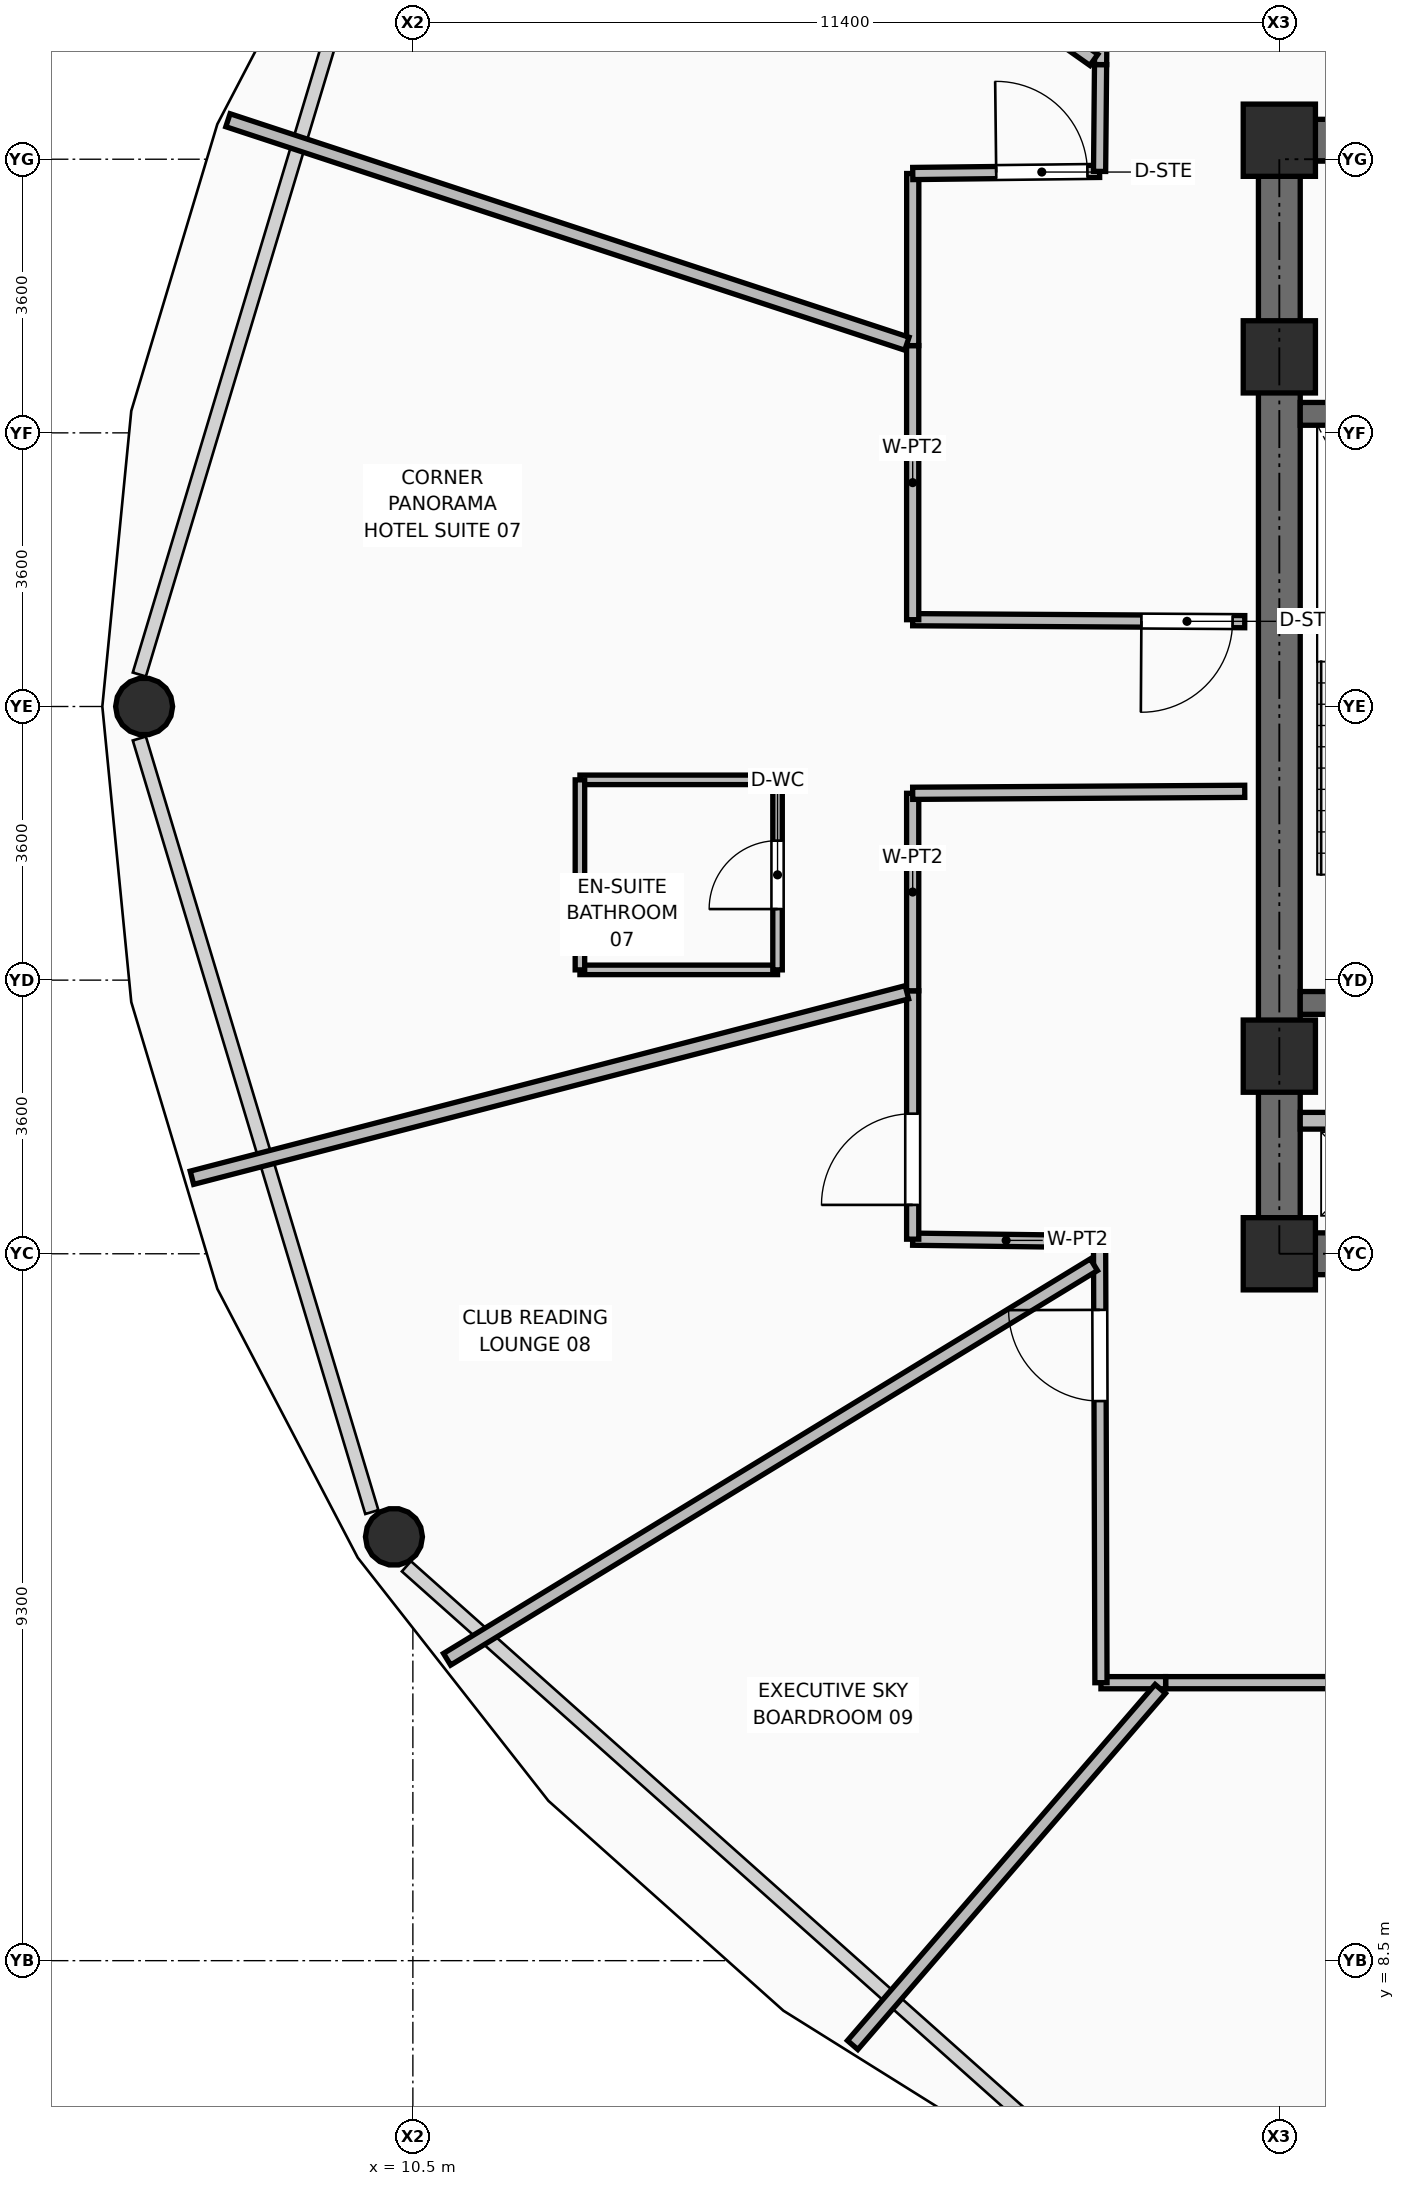
"""IFC4 building model, lengths in metres.
Left out: names, types, materials, properties, quantities, classifications, styles, units other than length and angle.
Written with IfcOpenShell. Run it as: python <this file> out.ifc"""

import sys

from ifc_helpers import new_model, si_unit, direction, frame, frame_2d, origin, origin_2d, place, context, subcontext, project, spatial, rectangle, hollow_circle, extrude, element, fill, save


model = new_model("IFC4")
c1 = context("Model", 3, precision=1e-05, world=origin(), true_north=direction((0.0, 1.0)))
c2 = subcontext(c1, "Body", "Model", "MODEL_VIEW")
j1 = project(units=[si_unit("LENGTHUNIT", "METRE"), si_unit("PLANEANGLEUNIT", "RADIAN")], contexts=[c1])
p1 = place(None, origin())
s1 = spatial("IfcSite", under=j1, at=p1, CompositionType="ELEMENT")
p2 = place(p1, origin())
s2 = spatial("IfcBuilding", under=s1, at=p2, CompositionType="ELEMENT")
p3 = place(p2, frame((0.0, 0.0, 164.7)))
s3 = spatial("IfcBuildingStorey", under=s2, at=p3, CompositionType="ELEMENT", Elevation=164.7)
for number, where, z_axis, x_axis in (
    (1, (21.9, 17.8, 0.0), (0.0, 0.0, 1.0), (1.0, 0.0, 0.0)),
    (2, (21.9, 20.4, 0.0), (0.0, 0.0, 1.0), (1.0, 0.0, 0.0)),
    (3, (21.9, 29.6, 0.0), (0.0, 0.0, 1.0), (1.0, 0.0, 0.0)),
    (4, (21.9, 32.45, 0.0), (0.0, 0.0, 1.0), (1.0, 0.0, 0.0)),
):
    element("IfcColumn", number, at=place(p3, frame(where, z_axis=z_axis, x_axis=x_axis)), inside=s3, PredefinedType="COLUMN", context=c2, shape_type="SweptSolid", body=[
        extrude(rectangle(XDim=0.95, YDim=0.95, at=origin_2d()), origin(), (0.0, 0.0, 1.0), 3.75),
    ])
for number, where, z_axis, x_axis in (
    (5, (6.964, 25.0, 0.0), (0.0, 0.0, 1.0), (1.0, 0.0, 0.0)),
    (6, (10.251, 14.076, 0.0), (0.0, 0.0, 1.0), (1.0, 0.0, 0.0)),
):
    element("IfcColumn", number, at=place(p3, frame(where, z_axis=z_axis, x_axis=x_axis)), inside=s3, PredefinedType="COLUMN", context=c2, shape_type="SweptSolid", body=[
        extrude(hollow_circle(Radius=0.375, WallThickness=0.035, at=origin_2d()), origin(), (0.0, 0.0, 1.0), 3.57),
    ])
p4 = place(p3, frame((21.625, 17.8, 0.0), z_axis=(0.0, 0.0, 1.0), x_axis=(1.0, 0.0, 0.0)))
e7 = element("IfcWall", 7, at=p4, inside=s3, PredefinedType="SHEAR", context=c2, shape_type="SweptSolid", body=[
    extrude(rectangle(XDim=2.125, YDim=0.55, at=frame_2d((1.062, 0.0))), origin(), (0.0, 0.0, 1.0), 3.57),
])
p5 = place(p3, frame((21.625, 32.45, 0.0), z_axis=(0.0, 0.0, 1.0), x_axis=(1.0, 0.0, 0.0)))
e8 = element("IfcWall", 8, at=p5, inside=s3, PredefinedType="SHEAR", context=c2, shape_type="SweptSolid", body=[
    extrude(rectangle(XDim=19.75, YDim=0.55, at=frame_2d((9.875, 0.0))), origin(), (0.0, 0.0, 1.0), 3.57),
])
p6 = place(p5, frame((2.125, 0.0, 0.0)))
e9 = element("IfcOpeningElement", 9, at=p6, cuts=e8, PredefinedType="OPENING", context=c2, shape_type="SweptSolid", body=[
    extrude(rectangle(XDim=1.1, YDim=2.1, at=frame_2d((0.55, 1.05))), frame((0.0, 0.285, 0.0), z_axis=(0.0, -1.0, 0.0), x_axis=(1.0, 0.0, 0.0)), (0.0, 0.0, 1.0), 0.57),
])
p7 = place(p5, frame((15.515, 0.0, 0.0)))
e10 = element("IfcOpeningElement", 10, at=p7, cuts=e8, PredefinedType="OPENING", context=c2, shape_type="SweptSolid", body=[
    extrude(rectangle(XDim=1.0, YDim=2.1, at=frame_2d((0.5, 1.05))), frame((0.0, 0.285, 0.0), z_axis=(0.0, -1.0, 0.0), x_axis=(1.0, 0.0, 0.0)), (0.0, 0.0, 1.0), 0.57),
])
p8 = place(p5, frame((17.525, 0.0, 0.0)))
e11 = element("IfcOpeningElement", 11, at=p8, cuts=e8, PredefinedType="OPENING", context=c2, shape_type="SweptSolid", body=[
    extrude(rectangle(XDim=0.9, YDim=2.1, at=frame_2d((0.45, 1.05))), frame((0.0, 0.285, 0.0), z_axis=(0.0, -1.0, 0.0), x_axis=(1.0, 0.0, 0.0)), (0.0, 0.0, 1.0), 0.57),
])
p9 = place(p3, frame((21.9, 18.075, 0.0), z_axis=(0.0, 0.0, 1.0), x_axis=(0.0, 1.0, 0.0)))
e12 = element("IfcWall", 12, at=p9, inside=s3, PredefinedType="SHEAR", context=c2, shape_type="SweptSolid", body=[
    extrude(rectangle(XDim=14.1, YDim=0.55, at=frame_2d((7.05, 0.0))), origin(), (0.0, 0.0, 1.0), 3.57),
])
p10 = place(p3, frame((22.175, 21.1, 0.0), z_axis=(0.0, 0.0, 1.0), x_axis=(1.0, 0.0, 0.0)))
e13 = element("IfcWall", 13, at=p10, inside=s3, PredefinedType="SHEAR", context=c2, shape_type="SweptSolid", body=[
    extrude(rectangle(XDim=3.565, YDim=0.3, at=frame_2d((1.782, 0.0))), origin(), (0.0, 0.0, 1.0), 3.57),
])
p11 = place(p10, frame((2.045, 0.0, 0.0)))
e14 = element("IfcOpeningElement", 14, at=p11, cuts=e13, PredefinedType="OPENING", context=c2, shape_type="SweptSolid", body=[
    extrude(rectangle(XDim=1.05, YDim=2.1, at=frame_2d((0.525, 1.05))), frame((0.0, 0.16, 0.0), z_axis=(0.0, -1.0, 0.0), x_axis=(1.0, 0.0, 0.0)), (0.0, 0.0, 1.0), 0.32),
])
p12 = place(p3, frame((22.175, 28.85, 0.0), z_axis=(0.0, 0.0, 1.0), x_axis=(1.0, 0.0, 0.0)))
e15 = element("IfcWall", 15, at=p12, inside=s3, PredefinedType="SHEAR", context=c2, shape_type="SweptSolid", body=[
    extrude(rectangle(XDim=3.565, YDim=0.3, at=frame_2d((1.782, 0.0))), origin(), (0.0, 0.0, 1.0), 3.57),
])
p13 = place(p3, frame((22.175, 19.55, 0.0), z_axis=(0.0, 0.0, 1.0), x_axis=(1.0, 0.0, 0.0)))
e16 = element("IfcWall", 16, at=p13, inside=s3, PredefinedType="PARTITIONING", context=c2, shape_type="SweptSolid", body=[
    extrude(rectangle(XDim=1.615, YDim=0.22, at=frame_2d((0.808, 0.0))), origin(), (0.0, 0.0, 1.0), 2.595),
])
p14 = place(p3, frame((21.445, 26.116, 0.0), z_axis=(0.0, 0.0, 1.0), x_axis=(-0.99998212632, 0.005978882852, 0.0)))
e17 = element("IfcWall", 17, at=p14, inside=s3, PredefinedType="PARTITIONING", context=c2, shape_type="SweptSolid", body=[
    extrude(rectangle(XDim=4.369, YDim=0.16, at=frame_2d((2.185, 0.0))), origin(), (0.0, 0.0, 1.0), 2.595),
])
p15 = place(p14, frame((0.16, 0.0, 0.0)))
e18 = element("IfcOpeningElement", 18, at=p15, cuts=e17, PredefinedType="OPENING", context=c2, shape_type="SweptSolid", body=[
    extrude(rectangle(XDim=1.2, YDim=2.1, at=frame_2d((0.6, 1.05))), frame((0.0, 0.09, 0.0), z_axis=(0.0, -1.0, 0.0), x_axis=(1.0, 0.0, 0.0)), (0.0, 0.0, 1.0), 0.18),
])
p16 = place(p3, frame((17.076, 26.142, 0.0), z_axis=(0.0, 0.0, 1.0), x_axis=(0.0, 1.0, 0.0)))
e19 = element("IfcWall", 19, at=p16, inside=s3, PredefinedType="PARTITIONING", context=c2, shape_type="SweptSolid", body=[
    extrude(rectangle(XDim=3.606, YDim=0.16, at=frame_2d((1.803, 0.0))), origin(), (0.0, 0.0, 1.0), 3.55),
])
p17 = place(p3, frame((17.076, 29.748, 0.0), z_axis=(0.0, 0.0, 1.0), x_axis=(0.000431359822, 0.999999906964, 0.0)))
e20 = element("IfcWall", 20, at=p17, inside=s3, PredefinedType="PARTITIONING", context=c2, shape_type="SweptSolid", body=[
    extrude(rectangle(XDim=2.264, YDim=0.16, at=frame_2d((1.132, 0.0))), origin(), (0.0, 0.0, 1.0), 3.55),
])
p18 = place(p3, frame((17.077, 32.012, 0.0), z_axis=(0.0, 0.0, 1.0), x_axis=(0.999934771592, 0.011421583108, 0.0)))
e21 = element("IfcWall", 21, at=p18, inside=s3, PredefinedType="PARTITIONING", context=c2, shape_type="SweptSolid", body=[
    extrude(rectangle(XDim=2.458, YDim=0.16, at=frame_2d((1.229, 0.0))), origin(), (0.0, 0.0, 1.0), 3.55),
])
p19 = place(p18, frame((1.098, 0.0, 0.0)))
e22 = element("IfcOpeningElement", 22, at=p19, cuts=e21, PredefinedType="OPENING", context=c2, shape_type="SweptSolid", body=[
    extrude(rectangle(XDim=1.2, YDim=2.1, at=frame_2d((0.6, 1.05))), frame((0.0, 0.09, 0.0), z_axis=(0.0, -1.0, 0.0), x_axis=(1.0, 0.0, 0.0)), (0.0, 0.0, 1.0), 0.18),
])
p20 = place(p3, frame((19.535, 32.04, 0.0), z_axis=(0.0, 0.0, 1.0), x_axis=(0.009382732056, 0.999955981201, 0.0)))
e23 = element("IfcWall", 23, at=p20, inside=s3, PredefinedType="PARTITIONING", context=c2, shape_type="SweptSolid", body=[
    extrude(rectangle(XDim=1.405, YDim=0.16, at=frame_2d((0.703, 0.0))), origin(), (0.0, 0.0, 1.0), 3.006),
])
p21 = place(p3, frame((19.548, 33.445, 0.0), z_axis=(0.0, 0.0, 1.0), x_axis=(0.008751227658, 0.999961707274, 0.0)))
e24 = element("IfcWall", 24, at=p21, inside=s3, PredefinedType="PARTITIONING", context=c2, shape_type="SweptSolid", body=[
    extrude(rectangle(XDim=1.367, YDim=0.16, at=frame_2d((0.684, 0.0))), origin(), (0.0, 0.0, 1.0), 3.55),
])
p22 = place(p3, frame((31.004, 12.162, 0.0), z_axis=(0.0, 0.0, 1.0), x_axis=(-0.999999883026, -0.000483681451, 0.0)))
e25 = element("IfcWall", 25, at=p22, inside=s3, PredefinedType="PARTITIONING", context=c2, shape_type="SweptSolid", body=[
    extrude(rectangle(XDim=10.6, YDim=0.16, at=frame_2d((5.3, 0.0))), origin(), (0.0, 0.0, 1.0), 3.006),
])
p23 = place(p22, frame((4.774, 0.0, 0.0)))
e26 = element("IfcOpeningElement", 26, at=p23, cuts=e25, PredefinedType="OPENING", context=c2, shape_type="SweptSolid", body=[
    extrude(rectangle(XDim=1.2, YDim=2.1, at=frame_2d((0.6, 1.05))), frame((0.0, 0.09, 0.0), z_axis=(0.0, -1.0, 0.0), x_axis=(1.0, 0.0, 0.0)), (0.0, 0.0, 1.0), 0.18),
])
p24 = place(p3, frame((20.404, 12.157, 0.0), z_axis=(0.0, 0.0, 1.0), x_axis=(-1.0, 0.0, 0.0)))
e27 = element("IfcWall", 27, at=p24, inside=s3, PredefinedType="PARTITIONING", context=c2, shape_type="SweptSolid", body=[
    extrude(rectangle(XDim=0.851, YDim=0.16, at=frame_2d((0.426, 0.0))), origin(), (0.0, 0.0, 1.0), 3.006),
])
p25 = place(p3, frame((19.553, 12.157, 0.0), z_axis=(0.0, 0.0, 1.0), x_axis=(-0.003113283747, 0.99999515372, 0.0)))
e28 = element("IfcWall", 28, at=p25, inside=s3, PredefinedType="PARTITIONING", context=c2, shape_type="SweptSolid", body=[
    extrude(rectangle(XDim=5.803, YDim=0.16, at=frame_2d((2.901, 0.0))), origin(), (0.0, 0.0, 1.0), 3.006),
])
p26 = place(p25, frame((3.705, 0.0, 0.0)))
e29 = element("IfcOpeningElement", 29, at=p26, cuts=e28, PredefinedType="OPENING", context=c2, shape_type="SweptSolid", body=[
    extrude(rectangle(XDim=1.2, YDim=2.1, at=frame_2d((0.6, 1.05))), frame((0.0, 0.09, 0.0), z_axis=(0.0, -1.0, 0.0), x_axis=(1.0, 0.0, 0.0)), (0.0, 0.0, 1.0), 0.18),
])
p27 = place(p3, frame((19.535, 17.96, 0.0), z_axis=(0.0, 0.0, 1.0), x_axis=(-0.999915428104, 0.013005254277, 0.0)))
e30 = element("IfcWall", 30, at=p27, inside=s3, PredefinedType="PARTITIONING", context=c2, shape_type="SweptSolid", body=[
    extrude(rectangle(XDim=2.459, YDim=0.16, at=frame_2d((1.229, 0.0))), origin(), (0.0, 0.0, 1.0), 3.55),
])
p28 = place(p3, frame((17.076, 17.992, 0.0), z_axis=(0.0, 0.0, 1.0), x_axis=(0.0, 1.0, 0.0)))
e31 = element("IfcWall", 31, at=p28, inside=s3, PredefinedType="PARTITIONING", context=c2, shape_type="SweptSolid", body=[
    extrude(rectangle(XDim=3.268, YDim=0.16, at=frame_2d((1.634, 0.0))), origin(), (0.0, 0.0, 1.0), 3.55),
])
p29 = place(p28, frame((0.451, 0.0, 0.0)))
e32 = element("IfcOpeningElement", 32, at=p29, cuts=e31, PredefinedType="OPENING", context=c2, shape_type="SweptSolid", body=[
    extrude(rectangle(XDim=1.2, YDim=2.1, at=frame_2d((0.6, 1.05))), frame((0.0, 0.09, 0.0), z_axis=(0.0, -1.0, 0.0), x_axis=(1.0, 0.0, 0.0)), (0.0, 0.0, 1.0), 0.18),
])
p30 = place(p3, frame((17.076, 21.26, 0.0), z_axis=(0.0, 0.0, 1.0), x_axis=(0.0, 1.0, 0.0)))
e33 = element("IfcWall", 33, at=p30, inside=s3, PredefinedType="PARTITIONING", context=c2, shape_type="SweptSolid", body=[
    extrude(rectangle(XDim=2.598, YDim=0.16, at=frame_2d((1.299, 0.0))), origin(), (0.0, 0.0, 1.0), 3.006),
])
p31 = place(p3, frame((17.076, 23.858, 0.0), z_axis=(0.0, 0.0, 1.0), x_axis=(0.99998212632, 0.005978882852, 0.0)))
e34 = element("IfcWall", 34, at=p31, inside=s3, PredefinedType="PARTITIONING", context=c2, shape_type="SweptSolid", body=[
    extrude(rectangle(XDim=4.369, YDim=0.16, at=frame_2d((2.185, 0.0))), origin(), (0.0, 0.0, 1.0), 2.595),
])
p32 = place(p3, frame((19.46, 33.507, 0.0), z_axis=(0.0, 0.0, 1.0), x_axis=(-0.816740398998, 0.577005303827, 0.0)))
e35 = element("IfcWall", 35, at=p32, inside=s3, PredefinedType="PARTITIONING", context=c2, shape_type="SweptSolid", body=[
    extrude(rectangle(XDim=9.194, YDim=0.18, at=frame_2d((4.597, 0.0))), origin(), (0.0, 0.0, 1.0), 2.852),
])
p33 = place(p3, frame((17.0, 29.773, 0.0), z_axis=(0.0, 0.0, 1.0), x_axis=(-0.949880965401, 0.312611822502, 0.0)))
e36 = element("IfcWall", 36, at=p33, inside=s3, PredefinedType="PARTITIONING", context=c2, shape_type="SweptSolid", body=[
    extrude(rectangle(XDim=9.405, YDim=0.18, at=frame_2d((4.702, 0.0))), origin(), (0.0, 0.0, 1.0), 2.852),
])
p34 = place(p3, frame((17.0, 21.24, 0.0), z_axis=(0.0, 0.0, 1.0), x_axis=(-0.96796954255, -0.251067649639, 0.0)))
e37 = element("IfcWall", 37, at=p34, inside=s3, PredefinedType="PARTITIONING", context=c2, shape_type="SweptSolid", body=[
    extrude(rectangle(XDim=9.718, YDim=0.18, at=frame_2d((4.859, 0.0))), origin(), (0.0, 0.0, 1.0), 2.852),
])
p35 = place(p3, frame((19.46, 17.656, 0.0), z_axis=(0.0, 0.0, 1.0), x_axis=(-0.853711993856, -0.520745457537, 0.0)))
e38 = element("IfcWall", 38, at=p35, inside=s3, PredefinedType="PARTITIONING", context=c2, shape_type="SweptSolid", body=[
    extrude(rectangle(XDim=9.968, YDim=0.18, at=frame_2d((4.984, 0.0))), origin(), (0.0, 0.0, 1.0), 2.852),
])
p36 = place(p3, frame((20.334, 12.075, 0.0), z_axis=(0.0, 0.0, 1.0), x_axis=(-0.653796426348, -0.756670491624, 0.0)))
e39 = element("IfcWall", 39, at=p36, inside=s3, PredefinedType="PARTITIONING", context=c2, shape_type="SweptSolid", body=[
    extrude(rectangle(XDim=6.192, YDim=0.18, at=frame_2d((3.096, 0.0))), origin(), (0.0, 0.0, 1.0), 2.852),
])
for number, where, z_axis, x_axis in (
    (40, (12.698, 21.535, 0.0), (0.0, 0.0, 1.0), (1.0, 0.0, 0.0)),
    (41, (12.698, 24.035, 0.0), (0.0, 0.0, 1.0), (1.0, 0.0, 0.0)),
):
    element("IfcWall", number, at=place(p3, frame(where, z_axis=z_axis, x_axis=x_axis)), inside=s3, PredefinedType="PARTITIONING", context=c2, shape_type="SweptSolid", body=[
        extrude(rectangle(XDim=2.6, YDim=0.125, at=frame_2d((1.3, 0.0))), origin(), (0.0, 0.0, 1.0), 3.55),
    ])
p37 = place(p3, frame((12.698, 21.535, 0.0), z_axis=(0.0, 0.0, 1.0), x_axis=(0.0, 1.0, 0.0)))
e42 = element("IfcWall", 42, at=p37, inside=s3, PredefinedType="PARTITIONING", context=c2, shape_type="SweptSolid", body=[
    extrude(rectangle(XDim=2.5, YDim=0.125, at=frame_2d((1.25, 0.0))), origin(), (0.0, 0.0, 1.0), 3.006),
])
p38 = place(p3, frame((15.298, 21.535, 0.0), z_axis=(0.0, 0.0, 1.0), x_axis=(0.0, 1.0, 0.0)))
e43 = element("IfcWall", 43, at=p38, inside=s3, PredefinedType="PARTITIONING", context=c2, shape_type="SweptSolid", body=[
    extrude(rectangle(XDim=2.5, YDim=0.125, at=frame_2d((1.25, 0.0))), origin(), (0.0, 0.0, 1.0), 3.006),
])
p39 = place(p38, frame((0.8, 0.0, 0.0)))
e44 = element("IfcOpeningElement", 44, at=p39, cuts=e43, PredefinedType="OPENING", context=c2, shape_type="SweptSolid", body=[
    extrude(rectangle(XDim=0.9, YDim=2.1, at=frame_2d((0.45, 1.05))), frame((0.0, 0.073, 0.0), z_axis=(0.0, -1.0, 0.0), x_axis=(1.0, 0.0, 0.0)), (0.0, 0.0, 1.0), 0.145),
])
p40 = place(p19, origin())
e45 = element("IfcDoor", 45, at=p40, inside=s3, OperationType="SINGLE_SWING_LEFT", PredefinedType="DOOR", context=c2, shape_type="SweptSolid", body=[
    extrude(rectangle(XDim=1.2, YDim=2.1, at=frame_2d((0.6, 1.05))), frame((0.0, 0.025, 0.0), z_axis=(0.0, -1.0, 0.0), x_axis=(1.0, 0.0, 0.0)), (0.0, 0.0, 1.0), 0.05),
])
fill(e22, e45)
p41 = place(p39, origin())
e46 = element("IfcDoor", 46, at=p41, inside=s3, OperationType="SINGLE_SWING_LEFT", PredefinedType="DOOR", context=c2, shape_type="SweptSolid", body=[
    extrude(rectangle(XDim=0.9, YDim=2.1, at=frame_2d((0.45, 1.05))), frame((0.0, 0.025, 0.0), z_axis=(0.0, -1.0, 0.0), x_axis=(1.0, 0.0, 0.0)), (0.0, 0.0, 1.0), 0.05),
])
fill(e44, e46)
p42 = place(p15, origin())
e47 = element("IfcDoor", 47, at=p42, inside=s3, OperationType="SINGLE_SWING_RIGHT", PredefinedType="DOOR", context=c2, shape_type="SweptSolid", body=[
    extrude(rectangle(XDim=1.2, YDim=2.1, at=frame_2d((0.6, 1.05))), frame((0.0, 0.025, 0.0), z_axis=(0.0, -1.0, 0.0), x_axis=(1.0, 0.0, 0.0)), (0.0, 0.0, 1.0), 0.05),
])
fill(e18, e47)
p43 = place(p29, origin())
e48 = element("IfcDoor", 48, at=p43, inside=s3, OperationType="SINGLE_SWING_LEFT", PredefinedType="DOOR", context=c2, shape_type="SweptSolid", body=[
    extrude(rectangle(XDim=1.2, YDim=2.1, at=frame_2d((0.6, 1.05))), frame((0.0, 0.025, 0.0), z_axis=(0.0, -1.0, 0.0), x_axis=(1.0, 0.0, 0.0)), (0.0, 0.0, 1.0), 0.05),
])
fill(e32, e48)
p44 = place(p26, origin())
e49 = element("IfcDoor", 49, at=p44, inside=s3, OperationType="SINGLE_SWING_RIGHT", PredefinedType="DOOR", context=c2, shape_type="SweptSolid", body=[
    extrude(rectangle(XDim=1.2, YDim=2.1, at=frame_2d((0.6, 1.05))), frame((0.0, 0.025, 0.0), z_axis=(0.0, -1.0, 0.0), x_axis=(1.0, 0.0, 0.0)), (0.0, 0.0, 1.0), 0.05),
])
fill(e29, e49)
save(model, sys.argv[1])
